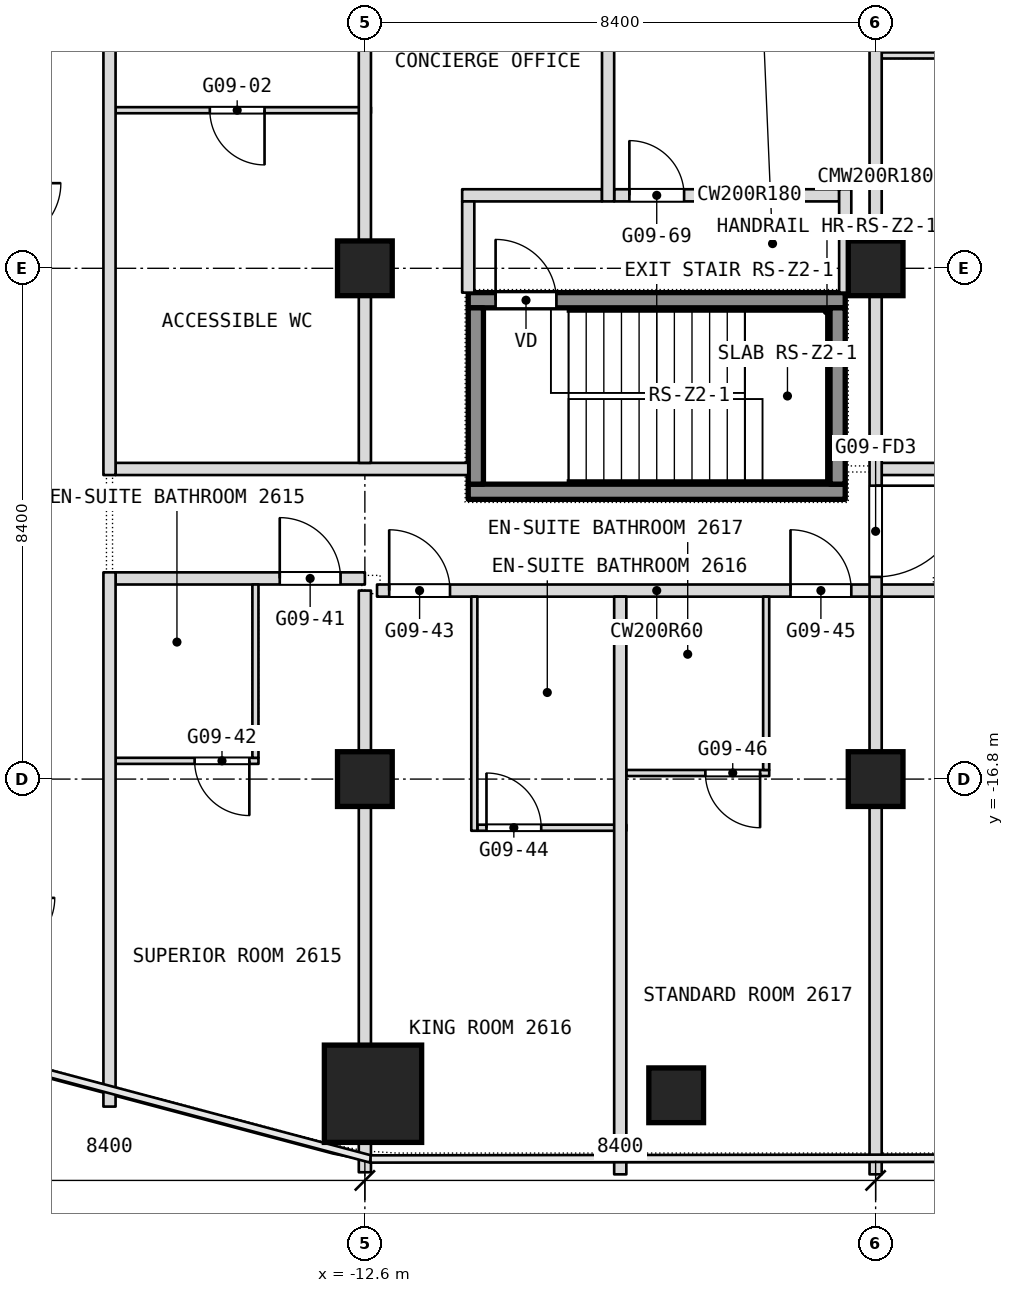
"""IFC4 building model, lengths in metres.
Left out: names, types, materials, properties, quantities, classifications, styles, units other than length and angle.
Written with IfcOpenShell. Run it as: python <this file> out.ifc"""

import sys

from ifc_helpers import new_model, si_unit, direction, frame, frame_2d, origin, origin_2d, place, context, subcontext, project, spatial, rectangle, extrude, element, fill, save


model = new_model("IFC4")
c1 = context("Model", 3, precision=1e-05, world=origin(), true_north=direction((0.0, 1.0)))
c2 = subcontext(c1, "Body", "Model", "MODEL_VIEW")
j1 = project(units=[si_unit("LENGTHUNIT", "METRE"), si_unit("PLANEANGLEUNIT", "RADIAN")], contexts=[c1])
p1 = place(None, origin())
s1 = spatial("IfcSite", under=j1, at=p1, CompositionType="ELEMENT")
p2 = place(p1, origin())
s2 = spatial("IfcBuilding", under=s1, at=p2, CompositionType="ELEMENT")
p3 = place(p2, frame((0.0, 0.0, 119.3)))
s3 = spatial("IfcBuildingStorey", under=s2, at=p3, CompositionType="ELEMENT", Elevation=119.3)
p4 = place(p3, frame((-12.466, -21.975, 0.0), z_axis=(0.0, 0.0, 1.0), x_axis=(1.0, 0.0, 0.0)))
e1 = element("IfcColumn", 1, at=p4, inside=s3, PredefinedType="COLUMN", context=c2, shape_type="SweptSolid", body=[
    extrude(rectangle(XDim=1.6, YDim=1.6, at=origin_2d()), origin(), (0.0, 0.0, 1.0), 3.6),
])
for number, where, z_axis, x_axis in (
    (2, (-12.6, -16.8, 0.0), (0.0, 0.0, 1.0), (1.0, 0.0, 0.0)),
    (3, (-12.6, -8.4, 0.0), (0.0, 0.0, 1.0), (1.0, 0.0, 0.0)),
    (4, (-4.2, -16.8, 0.0), (0.0, 0.0, 1.0), (1.0, 0.0, 0.0)),
    (5, (-4.2, -8.4, 0.0), (0.0, 0.0, 1.0), (1.0, 0.0, 0.0)),
    (6, (-7.48, -22.0, 0.0), (0.0, 0.0, 1.0), (1.0, 0.0, 0.0)),
):
    element("IfcColumn", number, at=place(p3, frame(where, z_axis=z_axis, x_axis=x_axis)), inside=s3, PredefinedType="COLUMN", context=c2, shape_type="SweptSolid", body=[
        extrude(rectangle(XDim=0.9, YDim=0.9, at=origin_2d()), origin(), (0.0, 0.0, 1.0), 3.6),
    ])
p5 = place(p3, frame((-10.75, -17.6, 0.0), z_axis=(0.0, 0.0, 1.0), x_axis=(1.0, 0.0, 0.0)))
e7 = element("IfcWall", 7, at=p5, inside=s3, PredefinedType="PARTITIONING", context=c2, shape_type="SweptSolid", body=[
    extrude(rectangle(XDim=2.45, YDim=0.1, at=frame_2d((1.225, 0.0))), origin(), (0.0, 0.0, 1.0), 3.34),
])
p6 = place(p5, frame((0.15, 0.0, 0.0)))
e8 = element("IfcOpeningElement", 8, at=p6, cuts=e7, PredefinedType="OPENING", context=c2, shape_type="SweptSolid", body=[
    extrude(rectangle(XDim=0.9, YDim=2.1, at=frame_2d((0.45, 1.05))), frame((0.0, 0.05, 0.0), z_axis=(0.0, -1.0, 0.0), x_axis=(1.0, 0.0, 0.0)), (0.0, 0.0, 1.0), 0.1),
])
p7 = place(p3, frame((-8.3, -16.7, 0.0), z_axis=(0.0, 0.0, 1.0), x_axis=(1.0, 0.0, 0.0)))
e9 = element("IfcWall", 9, at=p7, inside=s3, PredefinedType="PARTITIONING", context=c2, shape_type="SweptSolid", body=[
    extrude(rectangle(XDim=2.35, YDim=0.1, at=frame_2d((1.175, 0.0))), origin(), (0.0, 0.0, 1.0), 2.89),
])
p8 = place(p7, frame((1.3, 0.0, 0.0)))
e10 = element("IfcOpeningElement", 10, at=p8, cuts=e9, PredefinedType="OPENING", context=c2, shape_type="SweptSolid", body=[
    extrude(rectangle(XDim=0.9, YDim=2.1, at=frame_2d((0.45, 1.05))), frame((0.0, 0.05, 0.0), z_axis=(0.0, -1.0, 0.0), x_axis=(1.0, 0.0, 0.0)), (0.0, 0.0, 1.0), 0.1),
])
p9 = place(p3, frame((-16.7, -16.5, 0.0), z_axis=(0.0, 0.0, 1.0), x_axis=(1.0, 0.0, 0.0)))
e11 = element("IfcWall", 11, at=p9, inside=s3, PredefinedType="PARTITIONING", context=c2, shape_type="SweptSolid", body=[
    extrude(rectangle(XDim=2.35, YDim=0.1, at=frame_2d((1.175, 0.0))), origin(), (0.0, 0.0, 1.0), 3.34),
])
p10 = place(p9, frame((1.3, 0.0, 0.0)))
e12 = element("IfcOpeningElement", 12, at=p10, cuts=e11, PredefinedType="OPENING", context=c2, shape_type="SweptSolid", body=[
    extrude(rectangle(XDim=0.9, YDim=2.1, at=frame_2d((0.45, 1.05))), frame((0.0, 0.05, 0.0), z_axis=(0.0, -1.0, 0.0), x_axis=(1.0, 0.0, 0.0)), (0.0, 0.0, 1.0), 0.1),
])
p11 = place(p3, frame((-12.4, -13.7, 0.0), z_axis=(0.0, 0.0, 1.0), x_axis=(1.0, 0.0, 0.0)))
e13 = element("IfcWall", 13, at=p11, inside=s3, PredefinedType="PARTITIONING", context=c2, shape_type="SweptSolid", body=[
    extrude(rectangle(XDim=9.2, YDim=0.2, at=frame_2d((4.6, 0.0))), origin(), (0.0, 0.0, 1.0), 3.34),
])
p12 = place(p11, frame((0.2, 0.0, 0.0)))
e14 = element("IfcOpeningElement", 14, at=p12, cuts=e13, PredefinedType="OPENING", context=c2, shape_type="SweptSolid", body=[
    extrude(rectangle(XDim=1.0, YDim=2.1, at=frame_2d((0.5, 1.05))), frame((0.0, 0.1, 0.0), z_axis=(0.0, -1.0, 0.0), x_axis=(1.0, 0.0, 0.0)), (0.0, 0.0, 1.0), 0.2),
])
p13 = place(p11, frame((6.8, 0.0, 0.0)))
e15 = element("IfcOpeningElement", 15, at=p13, cuts=e13, PredefinedType="OPENING", context=c2, shape_type="SweptSolid", body=[
    extrude(rectangle(XDim=1.0, YDim=2.1, at=frame_2d((0.5, 1.05))), frame((0.0, 0.1, 0.0), z_axis=(0.0, -1.0, 0.0), x_axis=(1.0, 0.0, 0.0)), (0.0, 0.0, 1.0), 0.2),
])
p14 = place(p3, frame((-16.7, -13.5, 0.0), z_axis=(0.0, 0.0, 1.0), x_axis=(1.0, 0.0, 0.0)))
e16 = element("IfcWall", 16, at=p14, inside=s3, PredefinedType="PARTITIONING", context=c2, shape_type="SweptSolid", body=[
    extrude(rectangle(XDim=4.1, YDim=0.2, at=frame_2d((2.05, 0.0))), origin(), (0.0, 0.0, 1.0), 3.34),
])
p15 = place(p14, frame((2.7, 0.0, 0.0)))
e17 = element("IfcOpeningElement", 17, at=p15, cuts=e16, PredefinedType="OPENING", context=c2, shape_type="SweptSolid", body=[
    extrude(rectangle(XDim=1.0, YDim=2.1, at=frame_2d((0.5, 1.05))), frame((0.0, 0.1, 0.0), z_axis=(0.0, -1.0, 0.0), x_axis=(1.0, 0.0, 0.0)), (0.0, 0.0, 1.0), 0.2),
])
p16 = place(p3, frame((-16.7, -11.7, 0.0), z_axis=(0.0, 0.0, 1.0), x_axis=(1.0, 0.0, 0.0)))
e18 = element("IfcWall", 18, at=p16, inside=s3, PredefinedType="PARTITIONING", context=c2, shape_type="SweptSolid", body=[
    extrude(rectangle(XDim=5.8, YDim=0.2, at=frame_2d((2.9, 0.0))), origin(), (0.0, 0.0, 1.0), 3.34),
])
p17 = place(p3, frame((-4.1, -11.7, 0.0), z_axis=(0.0, 0.0, 1.0), x_axis=(1.0, 0.0, 0.0)))
e19 = element("IfcWall", 19, at=p17, inside=s3, PredefinedType="PARTITIONING", context=c2, shape_type="SweptSolid", body=[
    extrude(rectangle(XDim=20.8, YDim=0.2, at=frame_2d((10.4, 0.0))), origin(), (0.0, 0.0, 1.0), 3.34),
])
p18 = place(p3, frame((-11.0, -7.2, 0.0), z_axis=(0.0, 0.0, 1.0), x_axis=(1.0, 0.0, 0.0)))
e20 = element("IfcWall", 20, at=p18, inside=s3, PredefinedType="PARTITIONING", context=c2, shape_type="SweptSolid", body=[
    extrude(rectangle(XDim=2.3, YDim=0.2, at=frame_2d((1.15, 0.0))), origin(), (0.0, 0.0, 1.0), 3.34),
])
p19 = place(p3, frame((-8.5, -7.2, 0.0), z_axis=(0.0, 0.0, 1.0), x_axis=(1.0, 0.0, 0.0)))
e21 = element("IfcWall", 21, at=p19, inside=s3, PredefinedType="PARTITIONING", context=c2, shape_type="SweptSolid", body=[
    extrude(rectangle(XDim=3.7, YDim=0.2, at=frame_2d((1.85, 0.0))), origin(), (0.0, 0.0, 1.0), 3.34),
])
p20 = place(p19, frame((0.25, 0.0, 0.0)))
e22 = element("IfcOpeningElement", 22, at=p20, cuts=e21, PredefinedType="OPENING", context=c2, shape_type="SweptSolid", body=[
    extrude(rectangle(XDim=0.9, YDim=2.1, at=frame_2d((0.45, 1.05))), frame((0.0, 0.1, 0.0), z_axis=(0.0, -1.0, 0.0), x_axis=(1.0, 0.0, 0.0)), (0.0, 0.0, 1.0), 0.2),
])
p21 = place(p3, frame((-16.7, -5.8, 0.0), z_axis=(0.0, 0.0, 1.0), x_axis=(1.0, 0.0, 0.0)))
e23 = element("IfcWall", 23, at=p21, inside=s3, PredefinedType="PARTITIONING", context=c2, shape_type="SweptSolid", body=[
    extrude(rectangle(XDim=4.2, YDim=0.1, at=frame_2d((2.1, 0.0))), origin(), (0.0, 0.0, 1.0), 3.34),
])
p22 = place(p21, frame((1.55, 0.0, 0.0)))
e24 = element("IfcOpeningElement", 24, at=p22, cuts=e23, PredefinedType="OPENING", context=c2, shape_type="SweptSolid", body=[
    extrude(rectangle(XDim=0.9, YDim=2.1, at=frame_2d((0.45, 1.05))), frame((0.0, 0.05, 0.0), z_axis=(0.0, -1.0, 0.0), x_axis=(1.0, 0.0, 0.0)), (0.0, 0.0, 1.0), 0.1),
])
p23 = place(p3, frame((-4.1, -4.9, 0.0), z_axis=(0.0, 0.0, 1.0), x_axis=(1.0, 0.0, 0.0)))
e25 = element("IfcWall", 25, at=p23, inside=s3, PredefinedType="PARTITIONING", context=c2, shape_type="SweptSolid", body=[
    extrude(rectangle(XDim=4.2, YDim=0.1, at=frame_2d((2.1, 0.0))), origin(), (0.0, 0.0, 1.0), 3.34),
])
p24 = place(p23, frame((1.55, 0.0, 0.0)))
e26 = element("IfcOpeningElement", 26, at=p24, cuts=e25, PredefinedType="OPENING", context=c2, shape_type="SweptSolid", body=[
    extrude(rectangle(XDim=0.9, YDim=2.1, at=frame_2d((0.45, 1.05))), frame((0.0, 0.05, 0.0), z_axis=(0.0, -1.0, 0.0), x_axis=(1.0, 0.0, 0.0)), (0.0, 0.0, 1.0), 0.1),
])
p25 = place(p3, frame((-4.2, -23.3, 0.0), z_axis=(0.0, 0.0, 1.0), x_axis=(0.0, 1.0, 0.0)))
e27 = element("IfcWall", 27, at=p25, inside=s3, PredefinedType="PARTITIONING", context=c2, shape_type="SweptSolid", body=[
    extrude(rectangle(XDim=9.5, YDim=0.2, at=frame_2d((4.75, 0.0))), origin(), (0.0, 0.0, 1.0), 3.34),
])
p26 = place(p3, frame((-4.2, -13.8, 0.0), z_axis=(0.0, 0.0, 1.0), x_axis=(0.0, 1.0, 0.0)))
e28 = element("IfcWall", 28, at=p26, inside=s3, PredefinedType="PARTITIONING", context=c2, shape_type="SweptSolid", body=[
    extrude(rectangle(XDim=13.8, YDim=0.2, at=frame_2d((6.9, 0.0))), origin(), (0.0, 0.0, 1.0), 3.34),
])
p27 = place(p26, frame((12.15, 0.0, 0.0)))
e29 = element("IfcOpeningElement", 29, at=p27, cuts=e28, PredefinedType="OPENING", context=c2, shape_type="SweptSolid", body=[
    extrude(rectangle(XDim=1.5, YDim=2.1, at=frame_2d((0.75, 1.05))), frame((0.0, 0.1, 0.0), z_axis=(0.0, -1.0, 0.0), x_axis=(1.0, 0.0, 0.0)), (0.0, 0.0, 1.0), 0.2),
])
p28 = place(p26, frame((0.325, 0.0, 0.0)))
e30 = element("IfcOpeningElement", 30, at=p28, cuts=e28, PredefinedType="OPENING", context=c2, shape_type="SweptSolid", body=[
    extrude(rectangle(XDim=1.5, YDim=2.1, at=frame_2d((0.75, 1.05))), frame((0.0, 0.1, 0.0), z_axis=(0.0, -1.0, 0.0), x_axis=(1.0, 0.0, 0.0)), (0.0, 0.0, 1.0), 0.2),
])
p29 = place(p3, frame((-4.7, -8.8, 0.0), z_axis=(0.0, 0.0, 1.0), x_axis=(0.0, 1.0, 0.0)))
e31 = element("IfcWall", 31, at=p29, inside=s3, PredefinedType="PARTITIONING", context=c2, shape_type="SweptSolid", body=[
    extrude(rectangle(XDim=1.7, YDim=0.2, at=frame_2d((0.85, 0.0))), origin(), (0.0, 0.0, 1.0), 3.34),
])
p30 = place(p3, frame((-6.0, -16.65, 0.0), z_axis=(0.0, 0.0, 1.0), x_axis=(0.0, 1.0, 0.0)))
e32 = element("IfcWall", 32, at=p30, inside=s3, PredefinedType="PARTITIONING", context=c2, shape_type="SweptSolid", body=[
    extrude(rectangle(XDim=2.85, YDim=0.1, at=frame_2d((1.425, 0.0))), origin(), (0.0, 0.0, 1.0), 3.34),
])
p31 = place(p3, frame((-8.4, -23.3, 0.0), z_axis=(0.0, 0.0, 1.0), x_axis=(0.0, 1.0, 0.0)))
e33 = element("IfcWall", 33, at=p31, inside=s3, PredefinedType="PARTITIONING", context=c2, shape_type="SweptSolid", body=[
    extrude(rectangle(XDim=9.5, YDim=0.2, at=frame_2d((4.75, 0.0))), origin(), (0.0, 0.0, 1.0), 3.34),
])
p32 = place(p3, frame((-8.6, -7.3, 0.0), z_axis=(0.0, 0.0, 1.0), x_axis=(0.0, 1.0, 0.0)))
e34 = element("IfcWall", 34, at=p32, inside=s3, PredefinedType="PARTITIONING", context=c2, shape_type="SweptSolid", body=[
    extrude(rectangle(XDim=5.6, YDim=0.2, at=frame_2d((2.8, 0.0))), origin(), (0.0, 0.0, 1.0), 3.34),
])
p33 = place(p3, frame((-10.8, -17.65, 0.0), z_axis=(0.0, 0.0, 1.0), x_axis=(0.0, 1.0, 0.0)))
e35 = element("IfcWall", 35, at=p33, inside=s3, PredefinedType="PARTITIONING", context=c2, shape_type="SweptSolid", body=[
    extrude(rectangle(XDim=3.85, YDim=0.1, at=frame_2d((1.925, 0.0))), origin(), (0.0, 0.0, 1.0), 3.34),
])
p34 = place(p3, frame((-10.9, -8.8, 0.0), z_axis=(0.0, 0.0, 1.0), x_axis=(0.0, 1.0, 0.0)))
e36 = element("IfcWall", 36, at=p34, inside=s3, PredefinedType="PARTITIONING", context=c2, shape_type="SweptSolid", body=[
    extrude(rectangle(XDim=1.5, YDim=0.2, at=frame_2d((0.75, 0.0))), origin(), (0.0, 0.0, 1.0), 3.34),
])
p35 = place(p3, frame((-12.6, -23.266, 0.0), z_axis=(0.0, 0.0, 1.0), x_axis=(0.0, 1.0, 0.0)))
e37 = element("IfcWall", 37, at=p35, inside=s3, PredefinedType="PARTITIONING", context=c2, shape_type="SweptSolid", body=[
    extrude(rectangle(XDim=0.491, YDim=0.2, at=frame_2d((0.246, 0.0))), origin(), (0.0, 0.0, 1.0), 3.34),
])
p36 = place(p3, frame((-12.6, -21.175, 0.0), z_axis=(0.0, 0.0, 1.0), x_axis=(0.0, 1.0, 0.0)))
e38 = element("IfcWall", 38, at=p36, inside=s3, PredefinedType="PARTITIONING", context=c2, shape_type="SweptSolid", body=[
    extrude(rectangle(XDim=7.475, YDim=0.2, at=frame_2d((3.738, 0.0))), origin(), (0.0, 0.0, 1.0), 3.34),
])
p37 = place(p3, frame((-12.6, -11.6, 0.0), z_axis=(0.0, 0.0, 1.0), x_axis=(0.0, 1.0, 0.0)))
e39 = element("IfcWall", 39, at=p37, inside=s3, PredefinedType="PARTITIONING", context=c2, shape_type="SweptSolid", body=[
    extrude(rectangle(XDim=9.7, YDim=0.2, at=frame_2d((4.85, 0.0))), origin(), (0.0, 0.0, 1.0), 3.34),
])
p38 = place(p3, frame((-14.4, -16.45, 0.0), z_axis=(0.0, 0.0, 1.0), x_axis=(0.0, 1.0, 0.0)))
e40 = element("IfcWall", 40, at=p38, inside=s3, PredefinedType="PARTITIONING", context=c2, shape_type="SweptSolid", body=[
    extrude(rectangle(XDim=2.85, YDim=0.1, at=frame_2d((1.425, 0.0))), origin(), (0.0, 0.0, 1.0), 3.34),
])
p39 = place(p3, frame((-16.8, -22.186, 0.0), z_axis=(0.0, 0.0, 1.0), x_axis=(0.0, 1.0, 0.0)))
e41 = element("IfcWall", 41, at=p39, inside=s3, PredefinedType="PARTITIONING", context=c2, shape_type="SweptSolid", body=[
    extrude(rectangle(XDim=8.786, YDim=0.2, at=frame_2d((4.393, 0.0))), origin(), (0.0, 0.0, 1.0), 3.34),
])
p40 = place(p3, frame((-16.8, -11.8, 0.0), z_axis=(0.0, 0.0, 1.0), x_axis=(0.0, 1.0, 0.0)))
e42 = element("IfcWall", 42, at=p40, inside=s3, PredefinedType="PARTITIONING", context=c2, shape_type="SweptSolid", body=[
    extrude(rectangle(XDim=9.9, YDim=0.2, at=frame_2d((4.95, 0.0))), origin(), (0.0, 0.0, 1.0), 3.34),
])
p41 = place(p3, frame((-10.9, -12.075, 0.1), z_axis=(0.0, 0.0, 1.0), x_axis=(1.0, 0.0, 0.0)))
e43 = element("IfcWall", 43, at=p41, inside=s3, PredefinedType="SHEAR", context=c2, shape_type="SweptSolid", body=[
    extrude(rectangle(XDim=6.2, YDim=0.25, at=frame_2d((3.1, 0.0))), origin(), (0.0, 0.0, 1.0), 3.6),
])
p42 = place(p3, frame((-10.9, -8.925, 0.1), z_axis=(0.0, 0.0, 1.0), x_axis=(1.0, 0.0, 0.0)))
e44 = element("IfcWall", 44, at=p42, inside=s3, PredefinedType="SHEAR", context=c2, shape_type="SweptSolid", body=[
    extrude(rectangle(XDim=6.2, YDim=0.25, at=frame_2d((3.1, 0.0))), origin(), (0.0, 0.0, 1.0), 3.6),
])
p43 = place(p42, frame((0.45, 0.0, 0.0)))
e45 = element("IfcOpeningElement", 45, at=p43, cuts=e44, PredefinedType="OPENING", context=c2, shape_type="SweptSolid", body=[
    extrude(rectangle(XDim=1.0, YDim=2.1, at=frame_2d((0.5, 1.05))), frame((0.0, 0.125, 0.0), z_axis=(0.0, -1.0, 0.0), x_axis=(1.0, 0.0, 0.0)), (0.0, 0.0, 1.0), 0.25),
])
for number, where, z_axis, x_axis in (
    (46, (-10.775, -11.95, 0.1), (0.0, 0.0, 1.0), (0.0, 1.0, 0.0)),
    (47, (-4.825, -11.95, 0.1), (0.0, 0.0, 1.0), (0.0, 1.0, 0.0)),
):
    element("IfcWall", number, at=place(p3, frame(where, z_axis=z_axis, x_axis=x_axis)), inside=s3, PredefinedType="SHEAR", context=c2, shape_type="SweptSolid", body=[
        extrude(rectangle(XDim=2.9, YDim=0.25, at=frame_2d((1.45, 0.0))), origin(), (0.0, 0.0, 1.0), 3.6),
    ])
p44 = place(p6, origin())
e48 = element("IfcDoor", 48, at=p44, inside=s3, OperationType="SINGLE_SWING_LEFT", PredefinedType="DOOR", context=c2, shape_type="SweptSolid", body=[
    extrude(rectangle(XDim=0.9, YDim=2.1, at=frame_2d((0.45, 1.05))), frame((0.0, 0.025, 0.0), z_axis=(0.0, -1.0, 0.0), x_axis=(1.0, 0.0, 0.0)), (0.0, 0.0, 1.0), 0.05),
])
fill(e8, e48)
p45 = place(p8, origin())
e49 = element("IfcDoor", 49, at=p45, inside=s3, OperationType="SINGLE_SWING_RIGHT", PredefinedType="DOOR", context=c2, shape_type="SweptSolid", body=[
    extrude(rectangle(XDim=0.9, YDim=2.1, at=frame_2d((0.45, 1.05))), frame((0.0, 0.025, 0.0), z_axis=(0.0, -1.0, 0.0), x_axis=(1.0, 0.0, 0.0)), (0.0, 0.0, 1.0), 0.05),
])
fill(e10, e49)
p46 = place(p10, origin())
e50 = element("IfcDoor", 50, at=p46, inside=s3, OperationType="SINGLE_SWING_RIGHT", PredefinedType="DOOR", context=c2, shape_type="SweptSolid", body=[
    extrude(rectangle(XDim=0.9, YDim=2.1, at=frame_2d((0.45, 1.05))), frame((0.0, 0.025, 0.0), z_axis=(0.0, -1.0, 0.0), x_axis=(1.0, 0.0, 0.0)), (0.0, 0.0, 1.0), 0.05),
])
fill(e12, e50)
p47 = place(p12, origin())
e51 = element("IfcDoor", 51, at=p47, inside=s3, OperationType="SINGLE_SWING_RIGHT", PredefinedType="DOOR", context=c2, shape_type="SweptSolid", body=[
    extrude(rectangle(XDim=1.0, YDim=2.1, at=frame_2d((0.5, 1.05))), frame((0.0, 0.025, 0.0), z_axis=(0.0, -1.0, 0.0), x_axis=(1.0, 0.0, 0.0)), (0.0, 0.0, 1.0), 0.05),
])
fill(e14, e51)
p48 = place(p13, origin())
e52 = element("IfcDoor", 52, at=p48, inside=s3, OperationType="SINGLE_SWING_LEFT", PredefinedType="DOOR", context=c2, shape_type="SweptSolid", body=[
    extrude(rectangle(XDim=1.0, YDim=2.1, at=frame_2d((0.5, 1.05))), frame((0.0, 0.025, 0.0), z_axis=(0.0, -1.0, 0.0), x_axis=(1.0, 0.0, 0.0)), (0.0, 0.0, 1.0), 0.05),
])
fill(e15, e52)
p49 = place(p15, origin())
e53 = element("IfcDoor", 53, at=p49, inside=s3, OperationType="SINGLE_SWING_LEFT", PredefinedType="DOOR", context=c2, shape_type="SweptSolid", body=[
    extrude(rectangle(XDim=1.0, YDim=2.1, at=frame_2d((0.5, 1.05))), frame((0.0, 0.025, 0.0), z_axis=(0.0, -1.0, 0.0), x_axis=(1.0, 0.0, 0.0)), (0.0, 0.0, 1.0), 0.05),
])
fill(e17, e53)
p50 = place(p20, origin())
e54 = element("IfcDoor", 54, at=p50, inside=s3, OperationType="SINGLE_SWING_RIGHT", PredefinedType="DOOR", context=c2, shape_type="SweptSolid", body=[
    extrude(rectangle(XDim=0.9, YDim=2.1, at=frame_2d((0.45, 1.05))), frame((0.0, 0.025, 0.0), z_axis=(0.0, -1.0, 0.0), x_axis=(1.0, 0.0, 0.0)), (0.0, 0.0, 1.0), 0.05),
])
fill(e22, e54)
p51 = place(p22, origin())
e55 = element("IfcDoor", 55, at=p51, inside=s3, OperationType="SINGLE_SWING_RIGHT", PredefinedType="DOOR", context=c2, shape_type="SweptSolid", body=[
    extrude(rectangle(XDim=0.9, YDim=2.1, at=frame_2d((0.45, 1.05))), frame((0.0, 0.025, 0.0), z_axis=(0.0, -1.0, 0.0), x_axis=(1.0, 0.0, 0.0)), (0.0, 0.0, 1.0), 0.05),
])
fill(e24, e55)
p52 = place(p43, origin())
e56 = element("IfcDoor", 56, at=p52, inside=s3, OperationType="SINGLE_SWING_LEFT", PredefinedType="DOOR", context=c2, shape_type="SweptSolid", body=[
    extrude(rectangle(XDim=1.0, YDim=2.1, at=frame_2d((0.5, 1.05))), frame((0.0, 0.025, 0.0), z_axis=(0.0, -1.0, 0.0), x_axis=(1.0, 0.0, 0.0)), (0.0, 0.0, 1.0), 0.05),
])
fill(e45, e56)
p53 = place(p28, origin())
e57 = element("IfcDoor", 57, at=p53, inside=s3, OperationType="DOUBLE_DOOR_DOUBLE_SWING", PredefinedType="DOOR", context=c2, shape_type="SweptSolid", body=[
    extrude(rectangle(XDim=1.5, YDim=2.1, at=frame_2d((0.75, 1.05))), frame((0.0, 0.025, 0.0), z_axis=(0.0, -1.0, 0.0), x_axis=(1.0, 0.0, 0.0)), (0.0, 0.0, 1.0), 0.05),
])
fill(e30, e57)
save(model, sys.argv[1])
